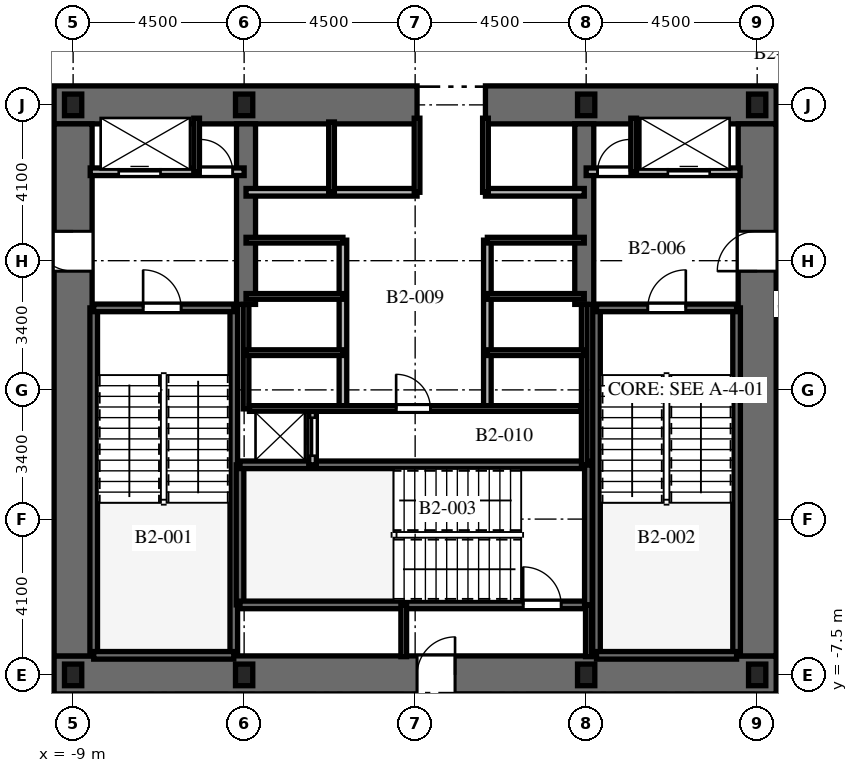
"""IFC4 building model, lengths in metres.
Left out: names, types, materials, properties, quantities, classifications, styles, units other than length and angle.
Written with IfcOpenShell. Run it as: python <this file> out.ifc"""

import sys

from ifc_helpers import new_model, si_unit, direction, frame, frame_2d, origin, origin_2d, place, context, subcontext, project, spatial, rectangle, i_section, extrude, element, fill, save


model = new_model("IFC4")
c1 = context("Model", 3, precision=1e-05, world=origin(), true_north=direction((0.0, 1.0)))
c2 = subcontext(c1, "Body", "Model", "MODEL_VIEW")
j1 = project(units=[si_unit("LENGTHUNIT", "METRE"), si_unit("PLANEANGLEUNIT", "RADIAN")], contexts=[c1])
p1 = place(None, origin())
s1 = spatial("IfcSite", under=j1, at=p1, CompositionType="ELEMENT")
p2 = place(p1, origin())
s2 = spatial("IfcBuilding", under=s1, at=p2, CompositionType="ELEMENT")
p3 = place(p2, frame((0.0, 0.0, -9.0)))
s3 = spatial("IfcBuildingStorey", under=s2, at=p3, CompositionType="ELEMENT", Elevation=-9.0)
p4 = place(p3, frame((-9.5, -7.5, 0.0), z_axis=(0.0, 0.0, 1.0), x_axis=(1.0, 0.0, 0.0)))
e1 = element("IfcWall", 1, at=p4, inside=s3, PredefinedType="SHEAR", context=c2, shape_type="SweptSolid", body=[
    extrude(rectangle(XDim=19.0, YDim=1.0, at=frame_2d((9.5, 0.0))), origin(), (0.0, 0.0, 1.0), 4.5),
])
p5 = place(p4, frame((9.55, 0.0, 0.0)))
e2 = element("IfcOpeningElement", 2, at=p5, cuts=e1, PredefinedType="OPENING", context=c2, shape_type="SweptSolid", body=[
    extrude(rectangle(XDim=1.0, YDim=2.15, at=frame_2d((0.5, 1.075))), frame((0.0, 0.51, 0.0), z_axis=(0.0, -1.0, 0.0), x_axis=(1.0, 0.0, 0.0)), (0.0, 0.0, 1.0), 1.02),
])
p6 = place(p3, frame((-9.5, 7.5, 0.0), z_axis=(0.0, 0.0, 1.0), x_axis=(1.0, 0.0, 0.0)))
e3 = element("IfcWall", 3, at=p6, inside=s3, PredefinedType="SHEAR", context=c2, shape_type="SweptSolid", body=[
    extrude(rectangle(XDim=9.55, YDim=1.0, at=frame_2d((4.775, 0.0))), origin(), (0.0, 0.0, 1.0), 4.5),
])
p7 = place(p3, frame((1.85, 7.5, 0.0), z_axis=(0.0, 0.0, 1.0), x_axis=(1.0, 0.0, 0.0)))
e4 = element("IfcWall", 4, at=p7, inside=s3, PredefinedType="SHEAR", context=c2, shape_type="SweptSolid", body=[
    extrude(rectangle(XDim=7.65, YDim=1.0, at=frame_2d((3.825, 0.0))), origin(), (0.0, 0.0, 1.0), 4.5),
])
p8 = place(p3, frame((-9.0, -7.0, 0.0), z_axis=(0.0, 0.0, 1.0), x_axis=(0.0, 1.0, 0.0)))
e5 = element("IfcWall", 5, at=p8, inside=s3, PredefinedType="SHEAR", context=c2, shape_type="SweptSolid", body=[
    extrude(rectangle(XDim=14.0, YDim=1.0, at=frame_2d((7.0, 0.0))), origin(), (0.0, 0.0, 1.0), 4.5),
])
p9 = place(p8, frame((10.125, 0.0, 0.0)))
e6 = element("IfcOpeningElement", 6, at=p9, cuts=e5, PredefinedType="OPENING", context=c2, shape_type="SweptSolid", body=[
    extrude(rectangle(XDim=1.05, YDim=2.15, at=frame_2d((0.525, 1.075))), frame((0.0, 0.51, 0.0), z_axis=(0.0, -1.0, 0.0), x_axis=(1.0, 0.0, 0.0)), (0.0, 0.0, 1.0), 1.02),
])
p10 = place(p3, frame((9.0, -7.0, 0.0), z_axis=(0.0, 0.0, 1.0), x_axis=(0.0, 1.0, 0.0)))
e7 = element("IfcWall", 7, at=p10, inside=s3, PredefinedType="SHEAR", context=c2, shape_type="SweptSolid", body=[
    extrude(rectangle(XDim=14.0, YDim=1.0, at=frame_2d((7.0, 0.0))), origin(), (0.0, 0.0, 1.0), 4.5),
])
p11 = place(p10, frame((10.125, 0.0, 0.0)))
e8 = element("IfcOpeningElement", 8, at=p11, cuts=e7, PredefinedType="OPENING", context=c2, shape_type="SweptSolid", body=[
    extrude(rectangle(XDim=1.05, YDim=2.15, at=frame_2d((0.525, 1.075))), frame((0.0, 0.51, 0.0), z_axis=(0.0, -1.0, 0.0), x_axis=(1.0, 0.0, 0.0)), (0.0, 0.0, 1.0), 1.02),
])
for number, where, z_axis, x_axis in (
    (9, (-4.45, 2.25, 0.0), (0.0, 0.0, 1.0), (0.0, 1.0, 0.0)),
    (10, (4.45, 2.25, 0.0), (0.0, 0.0, 1.0), (0.0, 1.0, 0.0)),
):
    element("IfcWall", number, at=place(p3, frame(where, z_axis=z_axis, x_axis=x_axis)), inside=s3, PredefinedType="SHEAR", context=c2, shape_type="SweptSolid", body=[
        extrude(rectangle(XDim=4.75, YDim=0.5, at=frame_2d((2.375, 0.0))), origin(), (0.0, 0.0, 1.0), 4.5),
    ])
for number, where, z_axis, x_axis in (
    (11, (-8.458, -6.985, 0.0), (0.0, 0.0, 1.0), (0.0, 1.0, 0.0)),
    (12, (-4.772, -6.985, 0.0), (0.0, 0.0, 1.0), (0.0, 1.0, 0.0)),
):
    element("IfcWall", number, at=place(p3, frame(where, z_axis=z_axis, x_axis=x_axis)), inside=s3, PredefinedType="SHEAR", context=c2, shape_type="SweptSolid", body=[
        extrude(rectangle(XDim=9.143, YDim=0.2, at=frame_2d((4.572, 0.0))), origin(), (0.0, 0.0, 1.0), 4.5),
    ])
p12 = place(p3, frame((-8.458, -6.985, 0.0), z_axis=(0.0, 0.0, 1.0), x_axis=(1.0, 0.0, 0.0)))
e13 = element("IfcWall", 13, at=p12, inside=s3, PredefinedType="SHEAR", context=c2, shape_type="SweptSolid", body=[
    extrude(rectangle(XDim=3.686, YDim=0.2, at=frame_2d((1.843, 0.0))), origin(), (0.0, 0.0, 1.0), 4.5),
])
p13 = place(p3, frame((-8.458, 2.158, 0.0), z_axis=(0.0, 0.0, 1.0), x_axis=(1.0, 0.0, 0.0)))
e14 = element("IfcWall", 14, at=p13, inside=s3, PredefinedType="SHEAR", context=c2, shape_type="SweptSolid", body=[
    extrude(rectangle(XDim=3.686, YDim=0.2, at=frame_2d((1.843, 0.0))), origin(), (0.0, 0.0, 1.0), 4.5),
])
p14 = place(p13, frame((1.3, 0.0, 0.0)))
e15 = element("IfcOpeningElement", 15, at=p14, cuts=e14, PredefinedType="OPENING", context=c2, shape_type="SweptSolid", body=[
    extrude(rectangle(XDim=1.0, YDim=2.15, at=frame_2d((0.5, 1.075))), frame((0.0, 0.11, 0.0), z_axis=(0.0, -1.0, 0.0), x_axis=(1.0, 0.0, 0.0)), (0.0, 0.0, 1.0), 0.22),
])
for number, where, z_axis, x_axis in (
    (16, (4.772, -6.985, 0.0), (0.0, 0.0, 1.0), (0.0, 1.0, 0.0)),
    (17, (8.458, -6.985, 0.0), (0.0, 0.0, 1.0), (0.0, 1.0, 0.0)),
):
    element("IfcWall", number, at=place(p3, frame(where, z_axis=z_axis, x_axis=x_axis)), inside=s3, PredefinedType="SHEAR", context=c2, shape_type="SweptSolid", body=[
        extrude(rectangle(XDim=9.143, YDim=0.2, at=frame_2d((4.572, 0.0))), origin(), (0.0, 0.0, 1.0), 4.5),
    ])
p15 = place(p3, frame((4.772, -6.985, 0.0), z_axis=(0.0, 0.0, 1.0), x_axis=(1.0, 0.0, 0.0)))
e18 = element("IfcWall", 18, at=p15, inside=s3, PredefinedType="SHEAR", context=c2, shape_type="SweptSolid", body=[
    extrude(rectangle(XDim=3.686, YDim=0.2, at=frame_2d((1.843, 0.0))), origin(), (0.0, 0.0, 1.0), 4.5),
])
p16 = place(p3, frame((4.772, 2.158, 0.0), z_axis=(0.0, 0.0, 1.0), x_axis=(1.0, 0.0, 0.0)))
e19 = element("IfcWall", 19, at=p16, inside=s3, PredefinedType="SHEAR", context=c2, shape_type="SweptSolid", body=[
    extrude(rectangle(XDim=3.686, YDim=0.2, at=frame_2d((1.843, 0.0))), origin(), (0.0, 0.0, 1.0), 4.5),
])
p17 = place(p16, frame((1.35, 0.0, 0.0)))
e20 = element("IfcOpeningElement", 20, at=p17, cuts=e19, PredefinedType="OPENING", context=c2, shape_type="SweptSolid", body=[
    extrude(rectangle(XDim=1.0, YDim=2.15, at=frame_2d((0.5, 1.075))), frame((0.0, 0.11, 0.0), z_axis=(0.0, -1.0, 0.0), x_axis=(1.0, 0.0, 0.0)), (0.0, 0.0, 1.0), 0.22),
])
p18 = place(p3, frame((-4.608, -5.658, 0.0), z_axis=(0.0, 0.0, 1.0), x_axis=(0.0, 1.0, 0.0)))
e21 = element("IfcWall", 21, at=p18, inside=s3, PredefinedType="SHEAR", context=c2, shape_type="SweptSolid", body=[
    extrude(rectangle(XDim=3.686, YDim=0.2, at=frame_2d((1.843, 0.0))), origin(), (0.0, 0.0, 1.0), 4.5),
])
p19 = place(p3, frame((-4.608, -5.658, 0.0), z_axis=(0.0, 0.0, 1.0), x_axis=(1.0, 0.0, 0.0)))
e22 = element("IfcWall", 22, at=p19, inside=s3, PredefinedType="SHEAR", context=c2, shape_type="SweptSolid", body=[
    extrude(rectangle(XDim=9.166, YDim=0.2, at=frame_2d((4.583, 0.0))), origin(), (0.0, 0.0, 1.0), 4.5),
])
p20 = place(p19, frame((7.45, 0.0, 0.0)))
e23 = element("IfcOpeningElement", 23, at=p20, cuts=e22, PredefinedType="OPENING", context=c2, shape_type="SweptSolid", body=[
    extrude(rectangle(XDim=1.0, YDim=2.15, at=frame_2d((0.5, 1.075))), frame((0.0, 0.11, 0.0), z_axis=(0.0, -1.0, 0.0), x_axis=(1.0, 0.0, 0.0)), (0.0, 0.0, 1.0), 0.22),
])
p21 = place(p3, frame((-4.608, -1.972, 0.0), z_axis=(0.0, 0.0, 1.0), x_axis=(1.0, 0.0, 0.0)))
e24 = element("IfcWall", 24, at=p21, inside=s3, PredefinedType="SHEAR", context=c2, shape_type="SweptSolid", body=[
    extrude(rectangle(XDim=9.166, YDim=0.2, at=frame_2d((4.583, 0.0))), origin(), (0.0, 0.0, 1.0), 4.5),
])
p22 = place(p3, frame((4.558, -5.658, 0.0), z_axis=(0.0, 0.0, 1.0), x_axis=(0.0, 1.0, 0.0)))
e25 = element("IfcWall", 25, at=p22, inside=s3, PredefinedType="SHEAR", context=c2, shape_type="SweptSolid", body=[
    extrude(rectangle(XDim=3.686, YDim=0.2, at=frame_2d((1.843, 0.0))), origin(), (0.0, 0.0, 1.0), 4.5),
])
for number, where, z_axis, x_axis in (
    (26, (-9.0, -7.5, 0.0), (0.0, 0.0, 1.0), (1.0, 0.0, 0.0)),
    (27, (-4.5, -7.5, 0.0), (0.0, 0.0, 1.0), (1.0, 0.0, 0.0)),
    (28, (4.5, -7.5, 0.0), (0.0, 0.0, 1.0), (1.0, 0.0, 0.0)),
    (29, (9.0, -7.5, 0.0), (0.0, 0.0, 1.0), (1.0, 0.0, 0.0)),
    (30, (9.0, 7.5, 0.0), (0.0, 0.0, 1.0), (1.0, 0.0, 0.0)),
    (31, (4.5, 7.5, 0.0), (0.0, 0.0, 1.0), (1.0, 0.0, 0.0)),
    (32, (-4.5, 7.5, 0.0), (0.0, 0.0, 1.0), (1.0, 0.0, 0.0)),
    (33, (-9.0, 7.5, 0.0), (0.0, 0.0, 1.0), (1.0, 0.0, 0.0)),
):
    element("IfcColumn", number, at=place(p3, frame(where, z_axis=z_axis, x_axis=x_axis)), inside=s3, PredefinedType="COLUMN", context=c2, shape_type="SweptSolid", body=[
        extrude(i_section(OverallWidth=0.454, OverallDepth=0.569, WebThickness=0.078, FlangeThickness=0.125, at=origin_2d()), origin(), (0.0, 0.0, 1.0), 4.5),
    ])
for number, where, z_axis, x_axis in (
    (34, (-0.3, -7.02, 0.0), (0.0, 0.0, 1.0), (0.0, 1.0, 0.0)),
    (35, (4.558, -7.02, 0.0), (0.0, 0.0, 1.0), (0.0, 1.0, 0.0)),
):
    element("IfcWall", number, at=place(p3, frame(where, z_axis=z_axis, x_axis=x_axis)), inside=s3, PredefinedType="PARTITIONING", context=c2, shape_type="SweptSolid", body=[
        extrude(rectangle(XDim=1.362, YDim=0.15, at=frame_2d((0.681, 0.0))), origin(), (0.0, 0.0, 1.0), 4.18),
    ])
p23 = place(p3, frame((-8.55, 5.74, 0.0), z_axis=(0.0, 0.0, 1.0), x_axis=(1.0, 0.0, 0.0)))
e36 = element("IfcWall", 36, at=p23, inside=s3, PredefinedType="PARTITIONING", context=c2, shape_type="SweptSolid", body=[
    extrude(rectangle(XDim=4.05, YDim=0.2, at=frame_2d((2.025, 0.0))), origin(), (0.0, 0.0, 1.0), 4.18),
])
p24 = place(p23, frame((0.75, 0.0, 0.0)))
e37 = element("IfcOpeningElement", 37, at=p24, cuts=e36, PredefinedType="OPENING", context=c2, shape_type="SweptSolid", body=[
    extrude(rectangle(XDim=1.1, YDim=2.2, at=frame_2d((0.55, 1.1))), frame((0.0, 0.11, 0.0), z_axis=(0.0, -1.0, 0.0), x_axis=(1.0, 0.0, 0.0)), (0.0, 0.0, 1.0), 0.22),
])
p25 = place(p23, frame((2.9, 0.0, 0.0)))
e38 = element("IfcOpeningElement", 38, at=p25, cuts=e36, PredefinedType="OPENING", context=c2, shape_type="SweptSolid", body=[
    extrude(rectangle(XDim=0.85, YDim=2.03, at=frame_2d((0.425, 1.015))), frame((0.0, 0.11, 0.0), z_axis=(0.0, -1.0, 0.0), x_axis=(1.0, 0.0, 0.0)), (0.0, 0.0, 1.0), 0.22),
])
p26 = place(p3, frame((-5.75, 5.74, 0.0), z_axis=(0.0, 0.0, 1.0), x_axis=(0.0, 1.0, 0.0)))
e39 = element("IfcWall", 39, at=p26, inside=s3, PredefinedType="PARTITIONING", context=c2, shape_type="SweptSolid", body=[
    extrude(rectangle(XDim=1.41, YDim=0.15, at=frame_2d((0.705, 0.0))), origin(), (0.0, 0.0, 1.0), 4.18),
])
p27 = place(p3, frame((4.5, 5.74, 0.0), z_axis=(0.0, 0.0, 1.0), x_axis=(1.0, 0.0, 0.0)))
e40 = element("IfcWall", 40, at=p27, inside=s3, PredefinedType="PARTITIONING", context=c2, shape_type="SweptSolid", body=[
    extrude(rectangle(XDim=4.05, YDim=0.2, at=frame_2d((2.025, 0.0))), origin(), (0.0, 0.0, 1.0), 4.18),
])
p28 = place(p27, frame((0.3, 0.0, 0.0)))
e41 = element("IfcOpeningElement", 41, at=p28, cuts=e40, PredefinedType="OPENING", context=c2, shape_type="SweptSolid", body=[
    extrude(rectangle(XDim=0.85, YDim=2.03, at=frame_2d((0.425, 1.015))), frame((0.0, 0.11, 0.0), z_axis=(0.0, -1.0, 0.0), x_axis=(1.0, 0.0, 0.0)), (0.0, 0.0, 1.0), 0.22),
])
p29 = place(p27, frame((2.15, 0.0, 0.0)))
e42 = element("IfcOpeningElement", 42, at=p29, cuts=e40, PredefinedType="OPENING", context=c2, shape_type="SweptSolid", body=[
    extrude(rectangle(XDim=1.1, YDim=2.2, at=frame_2d((0.55, 1.1))), frame((0.0, 0.11, 0.0), z_axis=(0.0, -1.0, 0.0), x_axis=(1.0, 0.0, 0.0)), (0.0, 0.0, 1.0), 0.22),
])
p30 = place(p3, frame((5.75, 5.74, 0.0), z_axis=(0.0, 0.0, 1.0), x_axis=(0.0, 1.0, 0.0)))
e43 = element("IfcWall", 43, at=p30, inside=s3, PredefinedType="PARTITIONING", context=c2, shape_type="SweptSolid", body=[
    extrude(rectangle(XDim=1.41, YDim=0.15, at=frame_2d((0.705, 0.0))), origin(), (0.0, 0.0, 1.0), 4.18),
])
p31 = place(p3, frame((-2.7, -1.972, 0.0), z_axis=(0.0, 0.0, 1.0), x_axis=(0.0, 1.0, 0.0)))
e44 = element("IfcWall", 44, at=p31, inside=s3, PredefinedType="PARTITIONING", context=c2, shape_type="SweptSolid", body=[
    extrude(rectangle(XDim=1.472, YDim=0.2, at=frame_2d((0.736, 0.0))), origin(), (0.0, 0.0, 1.0), 4.18),
])
p32 = place(p31, frame((0.24, 0.0, 0.0)))
e45 = element("IfcOpeningElement", 45, at=p32, cuts=e44, PredefinedType="OPENING", context=c2, shape_type="SweptSolid", body=[
    extrude(rectangle(XDim=1.0, YDim=2.2, at=frame_2d((0.5, 1.1))), frame((0.0, 0.11, 0.0), z_axis=(0.0, -1.0, 0.0), x_axis=(1.0, 0.0, 0.0)), (0.0, 0.0, 1.0), 0.22),
])
p33 = place(p3, frame((-4.45, 5.2, 0.0), z_axis=(0.0, 0.0, 1.0), x_axis=(1.0, 0.0, 0.0)))
e46 = element("IfcWall", 46, at=p33, inside=s3, PredefinedType="PARTITIONING", context=c2, shape_type="SweptSolid", body=[
    extrude(rectangle(XDim=4.5, YDim=0.2, at=frame_2d((2.25, 0.0))), origin(), (0.0, 0.0, 1.0), 4.18),
])
p34 = place(p3, frame((1.85, 5.2, 0.0), z_axis=(0.0, 0.0, 1.0), x_axis=(1.0, 0.0, 0.0)))
e47 = element("IfcWall", 47, at=p34, inside=s3, PredefinedType="PARTITIONING", context=c2, shape_type="SweptSolid", body=[
    extrude(rectangle(XDim=2.6, YDim=0.2, at=frame_2d((1.3, 0.0))), origin(), (0.0, 0.0, 1.0), 4.18),
])
p35 = place(p3, frame((-2.2, 5.2, 0.0), z_axis=(0.0, 0.0, 1.0), x_axis=(0.0, 1.0, 0.0)))
e48 = element("IfcWall", 48, at=p35, inside=s3, PredefinedType="PARTITIONING", context=c2, shape_type="SweptSolid", body=[
    extrude(rectangle(XDim=1.85, YDim=0.15, at=frame_2d((0.925, 0.0))), origin(), (0.0, 0.0, 1.0), 4.18),
])
for number, where, z_axis, x_axis in (
    (49, (0.05, 5.2, 0.0), (0.0, 0.0, 1.0), (0.0, 1.0, 0.0)),
    (50, (1.85, 5.2, 0.0), (0.0, 0.0, 1.0), (0.0, 1.0, 0.0)),
):
    element("IfcWall", number, at=place(p3, frame(where, z_axis=z_axis, x_axis=x_axis)), inside=s3, PredefinedType="PARTITIONING", context=c2, shape_type="SweptSolid", body=[
        extrude(rectangle(XDim=1.95, YDim=0.15, at=frame_2d((0.975, 0.0))), origin(), (0.0, 0.0, 1.0), 4.18),
    ])
p36 = place(p3, frame((-4.45, -0.5, 0.0), z_axis=(0.0, 0.0, 1.0), x_axis=(0.0, 1.0, 0.0)))
e51 = element("IfcWall", 51, at=p36, inside=s3, PredefinedType="PARTITIONING", context=c2, shape_type="SweptSolid", body=[
    extrude(rectangle(XDim=2.75, YDim=0.15, at=frame_2d((1.375, 0.0))), origin(), (0.0, 0.0, 1.0), 4.18),
])
p37 = place(p3, frame((4.45, -1.972, 0.0), z_axis=(0.0, 0.0, 1.0), x_axis=(0.0, 1.0, 0.0)))
e52 = element("IfcWall", 52, at=p37, inside=s3, PredefinedType="PARTITIONING", context=c2, shape_type="SweptSolid", body=[
    extrude(rectangle(XDim=4.222, YDim=0.15, at=frame_2d((2.111, 0.0))), origin(), (0.0, 0.0, 1.0), 4.18),
])
p38 = place(p3, frame((-1.9, -0.5, 0.0), z_axis=(0.0, 0.0, 1.0), x_axis=(0.0, 1.0, 0.0)))
e53 = element("IfcWall", 53, at=p38, inside=s3, PredefinedType="PARTITIONING", context=c2, shape_type="SweptSolid", body=[
    extrude(rectangle(XDim=4.44, YDim=0.2, at=frame_2d((2.22, 0.0))), origin(), (0.0, 0.0, 1.0), 4.18),
])
for number, where, z_axis, x_axis in (
    (54, (-4.45, 3.94, 0.0), (0.0, 0.0, 1.0), (1.0, 0.0, 0.0)),
    (55, (-4.45, 0.98, 0.0), (0.0, 0.0, 1.0), (1.0, 0.0, 0.0)),
    (56, (-4.45, 2.46, 0.0), (0.0, 0.0, 1.0), (1.0, 0.0, 0.0)),
):
    element("IfcWall", number, at=place(p3, frame(where, z_axis=z_axis, x_axis=x_axis)), inside=s3, PredefinedType="PARTITIONING", context=c2, shape_type="SweptSolid", body=[
        extrude(rectangle(XDim=2.55, YDim=0.15, at=frame_2d((1.275, 0.0))), origin(), (0.0, 0.0, 1.0), 4.18),
    ])
p39 = place(p3, frame((1.9, -0.5, 0.0), z_axis=(0.0, 0.0, 1.0), x_axis=(0.0, 1.0, 0.0)))
e57 = element("IfcWall", 57, at=p39, inside=s3, PredefinedType="PARTITIONING", context=c2, shape_type="SweptSolid", body=[
    extrude(rectangle(XDim=4.44, YDim=0.2, at=frame_2d((2.22, 0.0))), origin(), (0.0, 0.0, 1.0), 4.18),
])
for number, where, z_axis, x_axis in (
    (58, (1.9, 3.94, 0.0), (0.0, 0.0, 1.0), (1.0, 0.0, 0.0)),
    (59, (1.9, 0.98, 0.0), (0.0, 0.0, 1.0), (1.0, 0.0, 0.0)),
    (60, (1.9, 2.46, 0.0), (0.0, 0.0, 1.0), (1.0, 0.0, 0.0)),
):
    element("IfcWall", number, at=place(p3, frame(where, z_axis=z_axis, x_axis=x_axis)), inside=s3, PredefinedType="PARTITIONING", context=c2, shape_type="SweptSolid", body=[
        extrude(rectangle(XDim=2.55, YDim=0.15, at=frame_2d((1.275, 0.0))), origin(), (0.0, 0.0, 1.0), 4.18),
    ])
p40 = place(p3, frame((-4.36, -0.49, 0.0), z_axis=(0.0, 0.0, 1.0), x_axis=(1.0, 0.0, 0.0)))
e61 = element("IfcWall", 61, at=p40, inside=s3, PredefinedType="PARTITIONING", context=c2, shape_type="SweptSolid", body=[
    extrude(rectangle(XDim=8.72, YDim=0.15, at=frame_2d((4.36, 0.0))), origin(), (0.0, 0.0, 1.0), 4.18),
])
p41 = place(p40, frame((3.86, 0.0, 0.0)))
e62 = element("IfcOpeningElement", 62, at=p41, cuts=e61, PredefinedType="OPENING", context=c2, shape_type="SweptSolid", body=[
    extrude(rectangle(XDim=0.9, YDim=2.03, at=frame_2d((0.45, 1.015))), frame((0.0, 0.085, 0.0), z_axis=(0.0, -1.0, 0.0), x_axis=(1.0, 0.0, 0.0)), (0.0, 0.0, 1.0), 0.17),
])
p42 = place(p14, origin())
e63 = element("IfcDoor", 63, at=p42, inside=s3, OperationType="SINGLE_SWING_LEFT", PredefinedType="DOOR", context=c2, shape_type="SweptSolid", body=[
    extrude(rectangle(XDim=1.0, YDim=2.15, at=frame_2d((0.5, 1.075))), frame((0.0, 0.025, 0.0), z_axis=(0.0, -1.0, 0.0), x_axis=(1.0, 0.0, 0.0)), (0.0, 0.0, 1.0), 0.05),
])
fill(e15, e63)
p43 = place(p17, origin())
e64 = element("IfcDoor", 64, at=p43, inside=s3, OperationType="SINGLE_SWING_RIGHT", PredefinedType="DOOR", context=c2, shape_type="SweptSolid", body=[
    extrude(rectangle(XDim=1.0, YDim=2.15, at=frame_2d((0.5, 1.075))), frame((0.0, 0.025, 0.0), z_axis=(0.0, -1.0, 0.0), x_axis=(1.0, 0.0, 0.0)), (0.0, 0.0, 1.0), 0.05),
])
fill(e20, e64)
p44 = place(p20, origin())
e65 = element("IfcDoor", 65, at=p44, inside=s3, OperationType="SINGLE_SWING_LEFT", PredefinedType="DOOR", context=c2, shape_type="SweptSolid", body=[
    extrude(rectangle(XDim=1.0, YDim=2.15, at=frame_2d((0.5, 1.075))), frame((0.0, 0.025, 0.0), z_axis=(0.0, -1.0, 0.0), x_axis=(1.0, 0.0, 0.0)), (0.0, 0.0, 1.0), 0.05),
])
fill(e23, e65)
p45 = place(p5, origin())
e66 = element("IfcDoor", 66, at=p45, inside=s3, OperationType="SINGLE_SWING_RIGHT", PredefinedType="DOOR", context=c2, shape_type="SweptSolid", body=[
    extrude(rectangle(XDim=1.0, YDim=2.15, at=frame_2d((0.5, 1.075))), frame((0.0, 0.025, 0.0), z_axis=(0.0, -1.0, 0.0), x_axis=(1.0, 0.0, 0.0)), (0.0, 0.0, 1.0), 0.05),
])
fill(e2, e66)
p46 = place(p9, origin())
e67 = element("IfcDoor", 67, at=p46, inside=s3, OperationType="SINGLE_SWING_RIGHT", PredefinedType="DOOR", context=c2, shape_type="SweptSolid", body=[
    extrude(rectangle(XDim=1.05, YDim=2.15, at=frame_2d((0.525, 1.075))), frame((0.0, 0.025, 0.0), z_axis=(0.0, -1.0, 0.0), x_axis=(1.0, 0.0, 0.0)), (0.0, 0.0, 1.0), 0.05),
])
fill(e6, e67)
p47 = place(p11, origin())
e68 = element("IfcDoor", 68, at=p47, inside=s3, OperationType="SINGLE_SWING_LEFT", PredefinedType="DOOR", context=c2, shape_type="SweptSolid", body=[
    extrude(rectangle(XDim=1.05, YDim=2.15, at=frame_2d((0.525, 1.075))), frame((0.0, 0.025, 0.0), z_axis=(0.0, -1.0, 0.0), x_axis=(1.0, 0.0, 0.0)), (0.0, 0.0, 1.0), 0.05),
])
fill(e8, e68)
p48 = place(p24, origin())
e69 = element("IfcDoor", 69, at=p48, inside=s3, OperationType="SLIDING_TO_LEFT", PredefinedType="DOOR", context=c2, shape_type="SweptSolid", body=[
    extrude(rectangle(XDim=1.1, YDim=2.2, at=frame_2d((0.55, 1.1))), frame((0.0, 0.025, 0.0), z_axis=(0.0, -1.0, 0.0), x_axis=(1.0, 0.0, 0.0)), (0.0, 0.0, 1.0), 0.05),
])
fill(e37, e69)
p49 = place(p25, origin())
e70 = element("IfcDoor", 70, at=p49, inside=s3, OperationType="SINGLE_SWING_LEFT", PredefinedType="DOOR", context=c2, shape_type="SweptSolid", body=[
    extrude(rectangle(XDim=0.85, YDim=2.03, at=frame_2d((0.425, 1.015))), frame((0.0, 0.025, 0.0), z_axis=(0.0, -1.0, 0.0), x_axis=(1.0, 0.0, 0.0)), (0.0, 0.0, 1.0), 0.05),
])
fill(e38, e70)
p50 = place(p28, origin())
e71 = element("IfcDoor", 71, at=p50, inside=s3, OperationType="SINGLE_SWING_RIGHT", PredefinedType="DOOR", context=c2, shape_type="SweptSolid", body=[
    extrude(rectangle(XDim=0.85, YDim=2.03, at=frame_2d((0.425, 1.015))), frame((0.0, 0.025, 0.0), z_axis=(0.0, -1.0, 0.0), x_axis=(1.0, 0.0, 0.0)), (0.0, 0.0, 1.0), 0.05),
])
fill(e41, e71)
p51 = place(p29, origin())
e72 = element("IfcDoor", 72, at=p51, inside=s3, OperationType="SLIDING_TO_RIGHT", PredefinedType="DOOR", context=c2, shape_type="SweptSolid", body=[
    extrude(rectangle(XDim=1.1, YDim=2.2, at=frame_2d((0.55, 1.1))), frame((0.0, 0.025, 0.0), z_axis=(0.0, -1.0, 0.0), x_axis=(1.0, 0.0, 0.0)), (0.0, 0.0, 1.0), 0.05),
])
fill(e42, e72)
p52 = place(p32, origin())
e73 = element("IfcDoor", 73, at=p52, inside=s3, OperationType="SLIDING_TO_LEFT", PredefinedType="DOOR", context=c2, shape_type="SweptSolid", body=[
    extrude(rectangle(XDim=1.0, YDim=2.2, at=frame_2d((0.5, 1.1))), frame((0.0, 0.025, 0.0), z_axis=(0.0, -1.0, 0.0), x_axis=(1.0, 0.0, 0.0)), (0.0, 0.0, 1.0), 0.05),
])
fill(e45, e73)
p53 = place(p41, origin())
e74 = element("IfcDoor", 74, at=p53, inside=s3, OperationType="SINGLE_SWING_LEFT", PredefinedType="DOOR", context=c2, shape_type="SweptSolid", body=[
    extrude(rectangle(XDim=0.9, YDim=2.03, at=frame_2d((0.45, 1.015))), frame((0.0, 0.025, 0.0), z_axis=(0.0, -1.0, 0.0), x_axis=(1.0, 0.0, 0.0)), (0.0, 0.0, 1.0), 0.05),
])
fill(e62, e74)
save(model, sys.argv[1])
